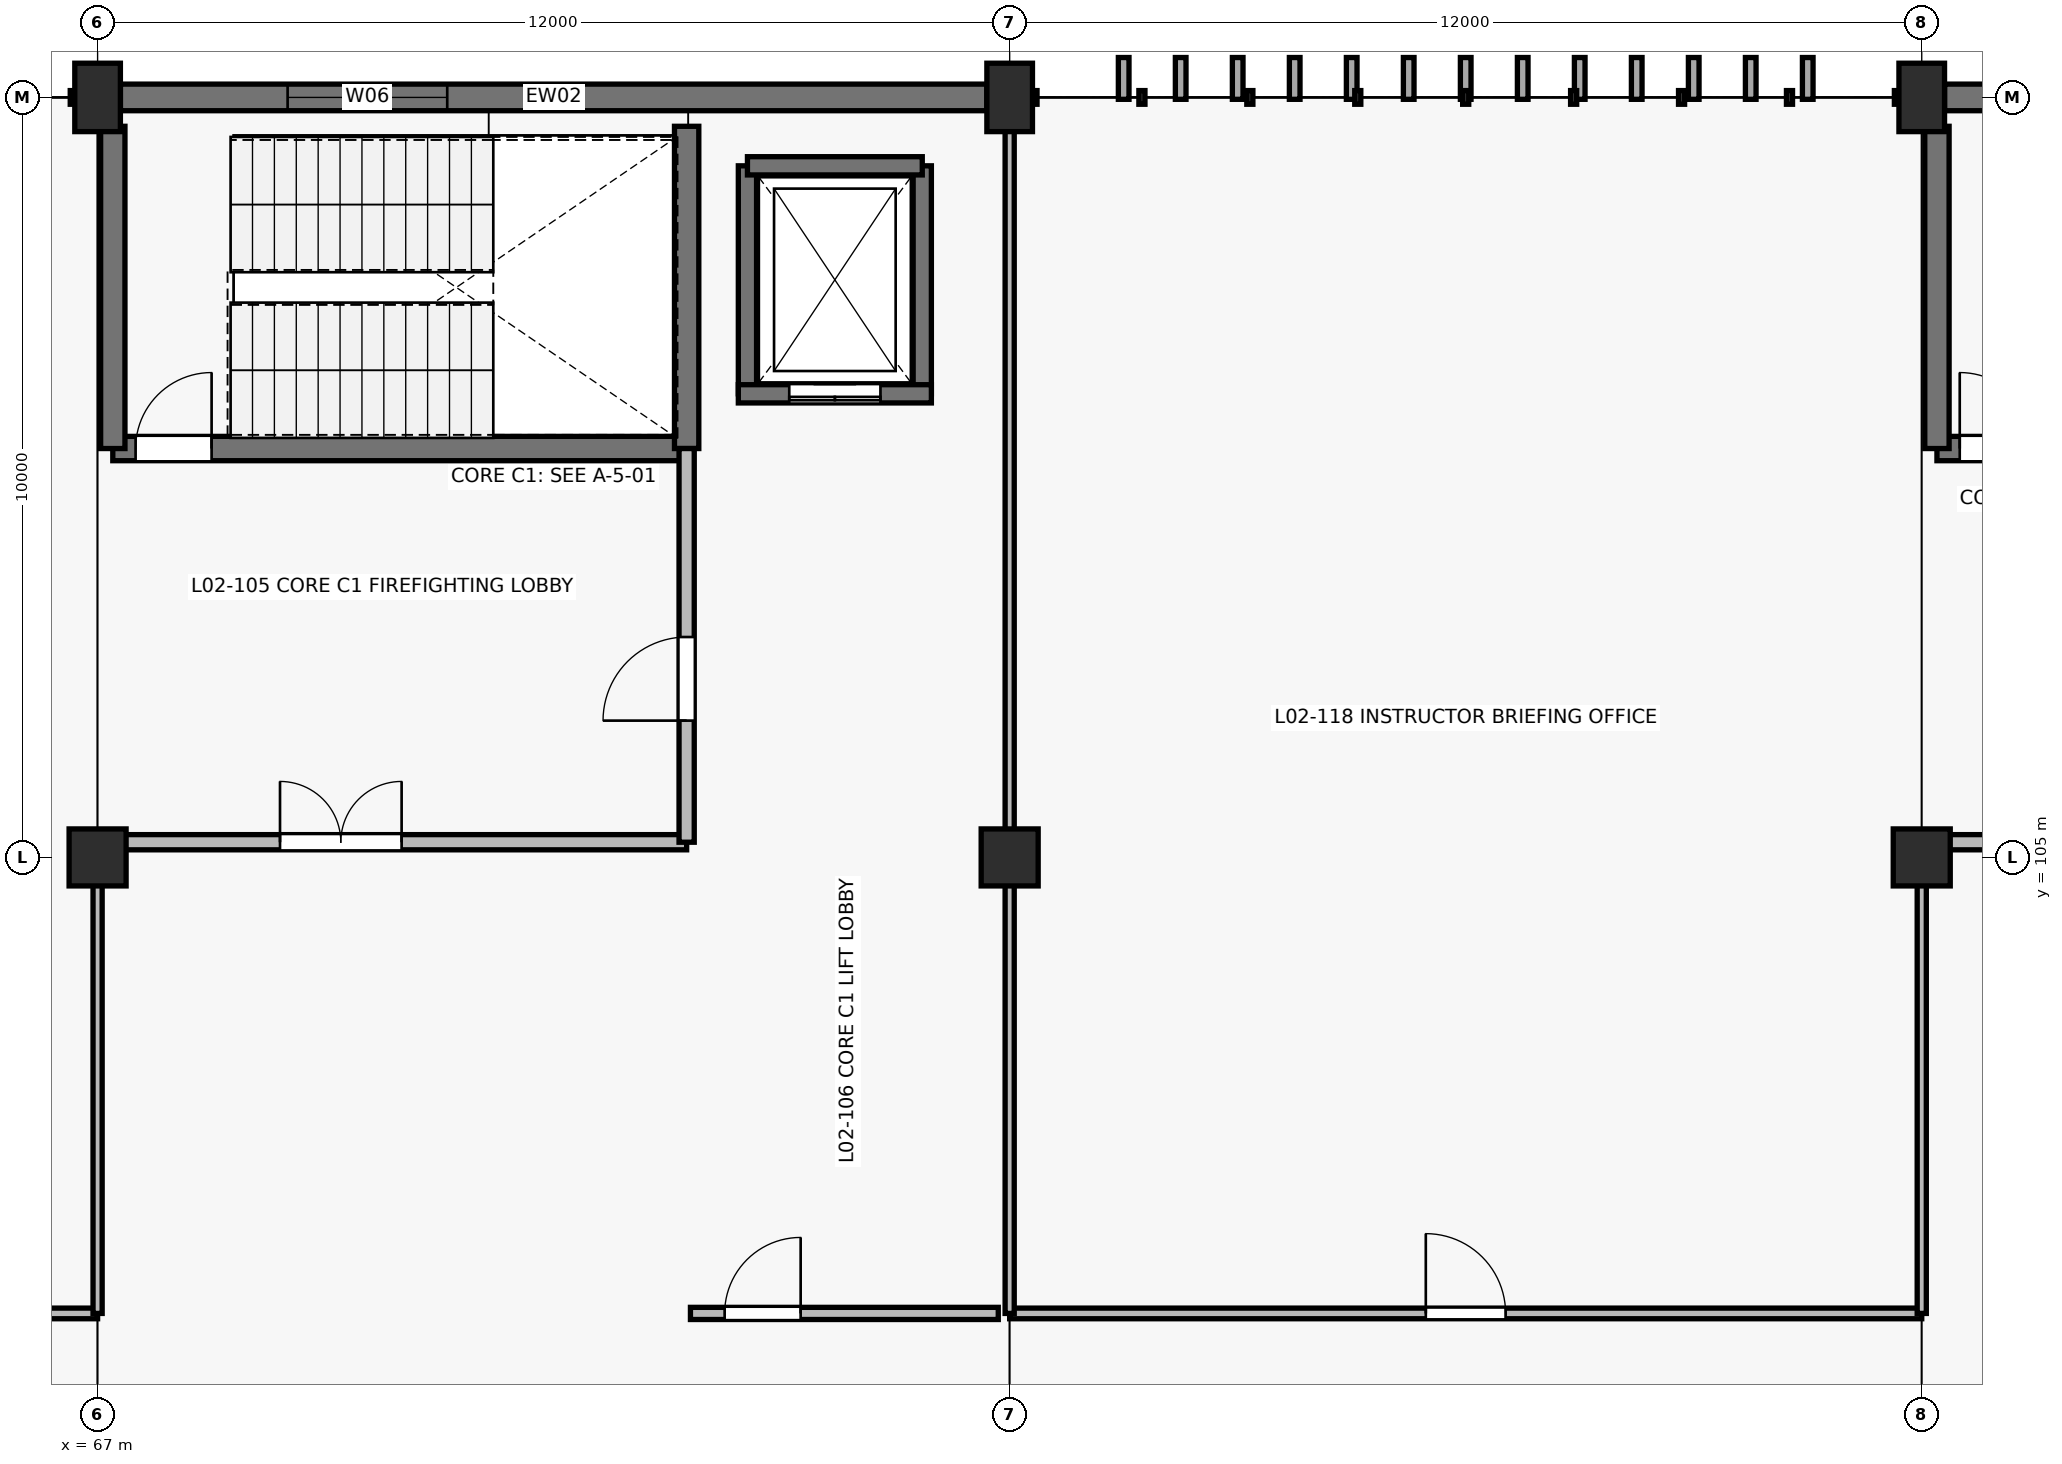
"""IFC4 building model, lengths in metres.
Left out: names, types, materials, properties, quantities, classifications, styles, units other than length and angle.
Written with IfcOpenShell. Run it as: python <this file> out.ifc"""

import sys

from ifc_helpers import new_model, si_unit, direction, frame, frame_2d, origin, origin_2d, place, context, subcontext, project, spatial, rectangle, extrude, element, fill, save


model = new_model("IFC4")
c1 = context("Model", 3, precision=1e-05, world=origin(), true_north=direction((0.0, 1.0)))
c2 = subcontext(c1, "Body", "Model", "MODEL_VIEW")
j1 = project(units=[si_unit("LENGTHUNIT", "METRE"), si_unit("PLANEANGLEUNIT", "RADIAN")], contexts=[c1])
p1 = place(None, origin())
s1 = spatial("IfcSite", under=j1, at=p1, CompositionType="ELEMENT")
p2 = place(p1, origin())
s2 = spatial("IfcBuilding", under=s1, at=p2, CompositionType="ELEMENT")
p3 = place(p2, frame((0.0, 0.0, 9.0)))
s3 = spatial("IfcBuildingStorey", under=s2, at=p3, CompositionType="ELEMENT", Elevation=9.0)
p4 = place(p3, frame((67.0, 105.0, 0.0), z_axis=(0.0, 0.0, 1.0), x_axis=(1.0, 0.0, 0.0)))
e1 = element("IfcColumn", 1, at=p4, inside=s3, PredefinedType="COLUMN", context=c2, shape_type="SweptSolid", body=[
    extrude(rectangle(XDim=0.75, YDim=0.75, at=origin_2d()), origin(), (0.0, 0.0, 1.0), 4.2),
])
p5 = place(p3, frame((67.0, 115.0, 0.0), z_axis=(0.0, 0.0, 1.0), x_axis=(1.0, 0.0, 0.0)))
e2 = element("IfcColumn", 2, at=p5, inside=s3, PredefinedType="COLUMN", context=c2, shape_type="SweptSolid", body=[
    extrude(rectangle(XDim=0.6, YDim=0.9, at=origin_2d()), origin(), (0.0, 0.0, 1.0), 4.2),
])
p6 = place(p3, frame((79.0, 105.0, 0.0), z_axis=(0.0, 0.0, 1.0), x_axis=(1.0, 0.0, 0.0)))
e3 = element("IfcColumn", 3, at=p6, inside=s3, PredefinedType="COLUMN", context=c2, shape_type="SweptSolid", body=[
    extrude(rectangle(XDim=0.75, YDim=0.75, at=origin_2d()), origin(), (0.0, 0.0, 1.0), 4.2),
])
p7 = place(p3, frame((79.0, 115.0, 0.0), z_axis=(0.0, 0.0, 1.0), x_axis=(1.0, 0.0, 0.0)))
e4 = element("IfcColumn", 4, at=p7, inside=s3, PredefinedType="COLUMN", context=c2, shape_type="SweptSolid", body=[
    extrude(rectangle(XDim=0.6, YDim=0.9, at=origin_2d()), origin(), (0.0, 0.0, 1.0), 4.2),
])
p8 = place(p3, frame((91.0, 105.0, 0.0), z_axis=(0.0, 0.0, 1.0), x_axis=(1.0, 0.0, 0.0)))
e5 = element("IfcColumn", 5, at=p8, inside=s3, PredefinedType="COLUMN", context=c2, shape_type="SweptSolid", body=[
    extrude(rectangle(XDim=0.75, YDim=0.75, at=origin_2d()), origin(), (0.0, 0.0, 1.0), 4.2),
])
p9 = place(p3, frame((91.0, 115.0, 0.0), z_axis=(0.0, 0.0, 1.0), x_axis=(1.0, 0.0, 0.0)))
e6 = element("IfcColumn", 6, at=p9, inside=s3, PredefinedType="COLUMN", context=c2, shape_type="SweptSolid", body=[
    extrude(rectangle(XDim=0.6, YDim=0.9, at=origin_2d()), origin(), (0.0, 0.0, 1.0), 4.2),
])
p10 = place(p3, frame((67.3, 115.0, 0.0), z_axis=(0.0, 0.0, 1.0), x_axis=(1.0, 0.0, 0.0)))
e7 = element("IfcWall", 7, at=p10, inside=s3, PredefinedType="SOLIDWALL", context=c2, shape_type="SweptSolid", body=[
    extrude(rectangle(XDim=11.4, YDim=0.35, at=frame_2d((5.7, 0.0))), origin(), (0.0, 0.0, 1.0), 4.2),
])
p11 = place(p10, frame((2.2, 0.0, 1.0)))
e8 = element("IfcOpeningElement", 8, at=p11, cuts=e7, PredefinedType="OPENING", context=c2, shape_type="SweptSolid", body=[
    extrude(rectangle(XDim=2.1, YDim=1.5, at=frame_2d((1.05, 0.75))), frame((0.0, 0.185, 0.0), z_axis=(0.0, -1.0, 0.0), x_axis=(1.0, 0.0, 0.0)), (0.0, 0.0, 1.0), 0.37),
])
p12 = place(p3, frame((91.3, 115.0, 0.0), z_axis=(0.0, 0.0, 1.0), x_axis=(1.0, 0.0, 0.0)))
e9 = element("IfcWall", 9, at=p12, inside=s3, PredefinedType="SOLIDWALL", context=c2, shape_type="SweptSolid", body=[
    extrude(rectangle(XDim=9.4, YDim=0.35, at=frame_2d((4.7, 0.0))), origin(), (0.0, 0.0, 1.0), 4.2),
])
p13 = place(p12, frame((2.2, 0.0, 1.0)))
e10 = element("IfcOpeningElement", 10, at=p13, cuts=e9, PredefinedType="OPENING", context=c2, shape_type="SweptSolid", body=[
    extrude(rectangle(XDim=2.7, YDim=1.5, at=frame_2d((1.35, 0.75))), frame((0.0, 0.185, 0.0), z_axis=(0.0, -1.0, 0.0), x_axis=(1.0, 0.0, 0.0)), (0.0, 0.0, 1.0), 0.37),
])
for number, where, z_axis, x_axis in (
    (11, (75.55, 111.1, 0.0), (0.0, 0.0, 1.0), (0.0, 1.0, 0.0)),
    (12, (77.85, 114.1, 0.0), (0.0, 0.0, 1.0), (0.0, -1.0, 0.0)),
):
    element("IfcWall", number, at=place(p3, frame(where, z_axis=z_axis, x_axis=x_axis)), inside=s3, PredefinedType="SHEAR", context=c2, shape_type="SweptSolid", body=[
        extrude(rectangle(XDim=3.0, YDim=0.24, at=frame_2d((1.5, 0.0))), origin(), (0.0, 0.0, 1.0), 4.2),
    ])
p14 = place(p3, frame((75.55, 114.1, 0.0), z_axis=(0.0, 0.0, 1.0), x_axis=(1.0, 0.0, 0.0)))
e13 = element("IfcWall", 13, at=p14, inside=s3, PredefinedType="SHEAR", context=c2, shape_type="SweptSolid", body=[
    extrude(rectangle(XDim=2.3, YDim=0.24, at=frame_2d((1.15, 0.0))), origin(), (0.0, 0.0, 1.0), 4.2),
])
p15 = place(p3, frame((77.97, 111.1, 0.0), z_axis=(0.0, 0.0, 1.0), x_axis=(-1.0, 0.0, 0.0)))
e14 = element("IfcWall", 14, at=p15, inside=s3, PredefinedType="SHEAR", context=c2, shape_type="SweptSolid", body=[
    extrude(rectangle(XDim=2.54, YDim=0.24, at=frame_2d((1.27, 0.0))), origin(), (0.0, 0.0, 1.0), 4.2),
])
p16 = place(p15, frame((0.67, 0.0, 0.0)))
e15 = element("IfcOpeningElement", 15, at=p16, cuts=e14, PredefinedType="OPENING", context=c2, shape_type="SweptSolid", body=[
    extrude(rectangle(XDim=1.2, YDim=2.15, at=frame_2d((0.6, 1.075))), frame((0.0, 0.13, 0.0), z_axis=(0.0, -1.0, 0.0), x_axis=(1.0, 0.0, 0.0)), (0.0, 0.0, 1.0), 0.26),
])
p17 = place(p3, frame((67.2, 110.38, 0.0), z_axis=(0.0, 0.0, 1.0), x_axis=(1.0, 0.0, 0.0)))
e16 = element("IfcWall", 16, at=p17, inside=s3, PredefinedType="SHEAR", context=c2, shape_type="SweptSolid", body=[
    extrude(rectangle(XDim=7.55, YDim=0.32, at=frame_2d((3.775, 0.0))), origin(), (0.0, 0.0, 1.0), 4.2),
])
p18 = place(p17, frame((0.3, 0.0, 0.0)))
e17 = element("IfcOpeningElement", 17, at=p18, cuts=e16, PredefinedType="OPENING", context=c2, shape_type="SweptSolid", body=[
    extrude(rectangle(XDim=1.0, YDim=2.15, at=frame_2d((0.5, 1.075))), frame((0.0, 0.17, 0.0), z_axis=(0.0, -1.0, 0.0), x_axis=(1.0, 0.0, 0.0)), (0.0, 0.0, 1.0), 0.34),
])
for number, where, z_axis, x_axis in (
    (18, (74.75, 110.38, 0.0), (0.0, 0.0, 1.0), (0.0, 1.0, 0.0)),
    (19, (67.2, 114.62, 0.0), (0.0, 0.0, 1.0), (0.0, -1.0, 0.0)),
):
    element("IfcWall", number, at=place(p3, frame(where, z_axis=z_axis, x_axis=x_axis)), inside=s3, PredefinedType="SHEAR", context=c2, shape_type="SweptSolid", body=[
        extrude(rectangle(XDim=4.24, YDim=0.32, at=frame_2d((2.12, 0.0))), origin(), (0.0, 0.0, 1.0), 4.2),
    ])
p19 = place(p3, frame((67.2, 105.2, 0.0), z_axis=(0.0, 0.0, 1.0), x_axis=(1.0, 0.0, 0.0)))
e20 = element("IfcWall", 20, at=p19, inside=s3, PredefinedType="PARTITIONING", context=c2, shape_type="SweptSolid", body=[
    extrude(rectangle(XDim=7.55, YDim=0.2, at=frame_2d((3.775, 0.0))), origin(), (0.0, 0.0, 1.0), 2.905),
])
p20 = place(p19, frame((2.2, 0.0, 0.0)))
e21 = element("IfcOpeningElement", 21, at=p20, cuts=e20, PredefinedType="OPENING", context=c2, shape_type="SweptSolid", body=[
    extrude(rectangle(XDim=1.6, YDim=2.2, at=frame_2d((0.8, 1.1))), frame((0.0, 0.11, 0.0), z_axis=(0.0, -1.0, 0.0), x_axis=(1.0, 0.0, 0.0)), (0.0, 0.0, 1.0), 0.22),
])
p21 = place(p3, frame((74.75, 105.2, 0.0), z_axis=(0.0, 0.0, 1.0), x_axis=(0.0, 1.0, 0.0)))
e22 = element("IfcWall", 22, at=p21, inside=s3, PredefinedType="PARTITIONING", context=c2, shape_type="SweptSolid", body=[
    extrude(rectangle(XDim=5.18, YDim=0.2, at=frame_2d((2.59, 0.0))), origin(), (0.0, 0.0, 1.0), 3.005),
])
p22 = place(p21, frame((1.6, 0.0, 0.0)))
e23 = element("IfcOpeningElement", 23, at=p22, cuts=e22, PredefinedType="OPENING", context=c2, shape_type="SweptSolid", body=[
    extrude(rectangle(XDim=1.1, YDim=2.15, at=frame_2d((0.55, 1.075))), frame((0.0, 0.11, 0.0), z_axis=(0.0, -1.0, 0.0), x_axis=(1.0, 0.0, 0.0)), (0.0, 0.0, 1.0), 0.22),
])
p23 = place(p3, frame((74.8, 99.0, 0.0), z_axis=(0.0, 0.0, 1.0), x_axis=(1.0, 0.0, 0.0)))
e24 = element("IfcWall", 24, at=p23, inside=s3, PredefinedType="PARTITIONING", context=c2, shape_type="SweptSolid", body=[
    extrude(rectangle(XDim=4.05, YDim=0.16, at=frame_2d((2.025, 0.0))), origin(), (0.0, 0.0, 1.0), 2.905),
])
p24 = place(p23, frame((0.45, 0.0, 0.0)))
e25 = element("IfcOpeningElement", 25, at=p24, cuts=e24, PredefinedType="OPENING", context=c2, shape_type="SweptSolid", body=[
    extrude(rectangle(XDim=1.0, YDim=2.15, at=frame_2d((0.5, 1.075))), frame((0.0, 0.09, 0.0), z_axis=(0.0, -1.0, 0.0), x_axis=(1.0, 0.0, 0.0)), (0.0, 0.0, 1.0), 0.18),
])
p25 = place(p3, frame((91.2, 110.38, 0.0), z_axis=(0.0, 0.0, 1.0), x_axis=(1.0, 0.0, 0.0)))
e26 = element("IfcWall", 26, at=p25, inside=s3, PredefinedType="SHEAR", context=c2, shape_type="SweptSolid", body=[
    extrude(rectangle(XDim=7.1, YDim=0.32, at=frame_2d((3.55, 0.0))), origin(), (0.0, 0.0, 1.0), 4.2),
])
p26 = place(p25, frame((0.3, 0.0, 0.0)))
e27 = element("IfcOpeningElement", 27, at=p26, cuts=e26, PredefinedType="OPENING", context=c2, shape_type="SweptSolid", body=[
    extrude(rectangle(XDim=1.0, YDim=2.15, at=frame_2d((0.5, 1.075))), frame((0.0, 0.17, 0.0), z_axis=(0.0, -1.0, 0.0), x_axis=(1.0, 0.0, 0.0)), (0.0, 0.0, 1.0), 0.34),
])
p27 = place(p3, frame((91.2, 114.62, 0.0), z_axis=(0.0, 0.0, 1.0), x_axis=(0.0, -1.0, 0.0)))
e28 = element("IfcWall", 28, at=p27, inside=s3, PredefinedType="SHEAR", context=c2, shape_type="SweptSolid", body=[
    extrude(rectangle(XDim=4.24, YDim=0.32, at=frame_2d((2.12, 0.0))), origin(), (0.0, 0.0, 1.0), 4.2),
])
p28 = place(p3, frame((91.2, 105.2, 0.0), z_axis=(0.0, 0.0, 1.0), x_axis=(1.0, 0.0, 0.0)))
e29 = element("IfcWall", 29, at=p28, inside=s3, PredefinedType="PARTITIONING", context=c2, shape_type="SweptSolid", body=[
    extrude(rectangle(XDim=7.1, YDim=0.2, at=frame_2d((3.55, 0.0))), origin(), (0.0, 0.0, 1.0), 2.905),
])
p29 = place(p28, frame((2.2, 0.0, 0.0)))
e30 = element("IfcOpeningElement", 30, at=p29, cuts=e29, PredefinedType="OPENING", context=c2, shape_type="SweptSolid", body=[
    extrude(rectangle(XDim=1.6, YDim=2.2, at=frame_2d((0.8, 1.1))), frame((0.0, 0.11, 0.0), z_axis=(0.0, -1.0, 0.0), x_axis=(1.0, 0.0, 0.0)), (0.0, 0.0, 1.0), 0.22),
])
p30 = place(p3, frame((43.18, 99.0, 0.0), z_axis=(0.0, 0.0, 1.0), x_axis=(1.0, 0.0, 0.0)))
e31 = element("IfcWall", 31, at=p30, inside=s3, PredefinedType="PARTITIONING", context=c2, shape_type="SweptSolid", body=[
    extrude(rectangle(XDim=23.82, YDim=0.14, at=frame_2d((11.91, 0.0))), origin(), (0.0, 0.0, 1.0), 2.905),
])
p31 = place(p30, frame((11.42, 0.0, 0.0)))
e32 = element("IfcOpeningElement", 32, at=p31, cuts=e31, PredefinedType="OPENING", context=c2, shape_type="SweptSolid", body=[
    extrude(rectangle(XDim=0.98, YDim=2.1, at=frame_2d((0.49, 1.05))), frame((0.0, 0.08, 0.0), z_axis=(0.0, -1.0, 0.0), x_axis=(1.0, 0.0, 0.0)), (0.0, 0.0, 1.0), 0.16),
])
p32 = place(p3, frame((67.0, 99.0, 0.0), z_axis=(0.0, 0.0, 1.0), x_axis=(0.0, 1.0, 0.0)))
e33 = element("IfcWall", 33, at=p32, inside=s3, PredefinedType="PARTITIONING", context=c2, shape_type="SweptSolid", body=[
    extrude(rectangle(XDim=6.2, YDim=0.12, at=frame_2d((3.1, 0.0))), origin(), (0.0, 0.0, 1.0), 2.905),
])
p33 = place(p3, frame((79.0, 99.0, 0.0), z_axis=(0.0, 0.0, 1.0), x_axis=(1.0, 0.0, 0.0)))
e34 = element("IfcWall", 34, at=p33, inside=s3, PredefinedType="PARTITIONING", context=c2, shape_type="SweptSolid", body=[
    extrude(rectangle(XDim=12.0, YDim=0.14, at=frame_2d((6.0, 0.0))), origin(), (0.0, 0.0, 1.0), 2.905),
])
p34 = place(p33, frame((5.475, 0.0, 0.0)))
e35 = element("IfcOpeningElement", 35, at=p34, cuts=e34, PredefinedType="OPENING", context=c2, shape_type="SweptSolid", body=[
    extrude(rectangle(XDim=1.05, YDim=2.1, at=frame_2d((0.525, 1.05))), frame((0.0, 0.08, 0.0), z_axis=(0.0, -1.0, 0.0), x_axis=(1.0, 0.0, 0.0)), (0.0, 0.0, 1.0), 0.16),
])
p35 = place(p3, frame((79.0, 99.0, 0.0), z_axis=(0.0, 0.0, 1.0), x_axis=(0.0, 1.0, 0.0)))
e36 = element("IfcWall", 36, at=p35, inside=s3, PredefinedType="PARTITIONING", context=c2, shape_type="SweptSolid", body=[
    extrude(rectangle(XDim=15.75, YDim=0.12, at=frame_2d((7.875, 0.0))), origin(), (0.0, 0.0, 1.0), 2.905),
])
p36 = place(p3, frame((91.0, 99.0, 0.0), z_axis=(0.0, 0.0, 1.0), x_axis=(0.0, 1.0, 0.0)))
e37 = element("IfcWall", 37, at=p36, inside=s3, PredefinedType="PARTITIONING", context=c2, shape_type="SweptSolid", body=[
    extrude(rectangle(XDim=6.2, YDim=0.12, at=frame_2d((3.1, 0.0))), origin(), (0.0, 0.0, 1.0), 2.905),
])
p37 = place(p11, origin())
e38 = element("IfcWindow", 38, at=p37, inside=s3, PartitioningType="DOUBLE_PANEL_VERTICAL", PredefinedType="WINDOW", context=c2, shape_type="SweptSolid", body=[
    extrude(rectangle(XDim=2.1, YDim=1.5, at=frame_2d((1.05, 0.75))), frame((0.0, 0.03, 0.0), z_axis=(0.0, -1.0, 0.0), x_axis=(1.0, 0.0, 0.0)), (0.0, 0.0, 1.0), 0.06),
])
fill(e8, e38)
p38 = place(p16, origin())
e39 = element("IfcDoor", 39, at=p38, inside=s3, OperationType="DOUBLE_DOOR_SLIDING", PredefinedType="USERDEFINED", context=c2, shape_type="SweptSolid", body=[
    extrude(rectangle(XDim=1.2, YDim=2.15, at=frame_2d((0.6, 1.075))), frame((0.0, 0.025, 0.0), z_axis=(0.0, -1.0, 0.0), x_axis=(1.0, 0.0, 0.0)), (0.0, 0.0, 1.0), 0.05),
])
fill(e15, e39)
p39 = place(p18, origin())
e40 = element("IfcDoor", 40, at=p39, inside=s3, OperationType="SINGLE_SWING_RIGHT", PredefinedType="DOOR", context=c2, shape_type="SweptSolid", body=[
    extrude(rectangle(XDim=1.0, YDim=2.15, at=frame_2d((0.5, 1.075))), frame((0.0, 0.025, 0.0), z_axis=(0.0, -1.0, 0.0), x_axis=(1.0, 0.0, 0.0)), (0.0, 0.0, 1.0), 0.05),
])
fill(e17, e40)
p40 = place(p20, origin())
e41 = element("IfcDoor", 41, at=p40, inside=s3, OperationType="DOUBLE_DOOR_SINGLE_SWING", PredefinedType="DOOR", context=c2, shape_type="SweptSolid", body=[
    extrude(rectangle(XDim=1.6, YDim=2.2, at=frame_2d((0.8, 1.1))), frame((0.0, 0.025, 0.0), z_axis=(0.0, -1.0, 0.0), x_axis=(1.0, 0.0, 0.0)), (0.0, 0.0, 1.0), 0.05),
])
fill(e21, e41)
p41 = place(p22, origin())
e42 = element("IfcDoor", 42, at=p41, inside=s3, OperationType="SINGLE_SWING_LEFT", PredefinedType="DOOR", context=c2, shape_type="SweptSolid", body=[
    extrude(rectangle(XDim=1.1, YDim=2.15, at=frame_2d((0.55, 1.075))), frame((0.0, 0.025, 0.0), z_axis=(0.0, -1.0, 0.0), x_axis=(1.0, 0.0, 0.0)), (0.0, 0.0, 1.0), 0.05),
])
fill(e23, e42)
p42 = place(p24, origin())
e43 = element("IfcDoor", 43, at=p42, inside=s3, OperationType="SINGLE_SWING_RIGHT", PredefinedType="DOOR", context=c2, shape_type="SweptSolid", body=[
    extrude(rectangle(XDim=1.0, YDim=2.15, at=frame_2d((0.5, 1.075))), frame((0.0, 0.025, 0.0), z_axis=(0.0, -1.0, 0.0), x_axis=(1.0, 0.0, 0.0)), (0.0, 0.0, 1.0), 0.05),
])
fill(e25, e43)
p43 = place(p26, origin())
e44 = element("IfcDoor", 44, at=p43, inside=s3, OperationType="SINGLE_SWING_LEFT", PredefinedType="DOOR", context=c2, shape_type="SweptSolid", body=[
    extrude(rectangle(XDim=1.0, YDim=2.15, at=frame_2d((0.5, 1.075))), frame((0.0, 0.025, 0.0), z_axis=(0.0, -1.0, 0.0), x_axis=(1.0, 0.0, 0.0)), (0.0, 0.0, 1.0), 0.05),
])
fill(e27, e44)
p44 = place(p34, origin())
e45 = element("IfcDoor", 45, at=p44, inside=s3, OperationType="SINGLE_SWING_LEFT", PredefinedType="DOOR", context=c2, shape_type="SweptSolid", body=[
    extrude(rectangle(XDim=1.05, YDim=2.1, at=frame_2d((0.525, 1.05))), frame((0.0, 0.025, 0.0), z_axis=(0.0, -1.0, 0.0), x_axis=(1.0, 0.0, 0.0)), (0.0, 0.0, 1.0), 0.05),
])
fill(e35, e45)
save(model, sys.argv[1])
